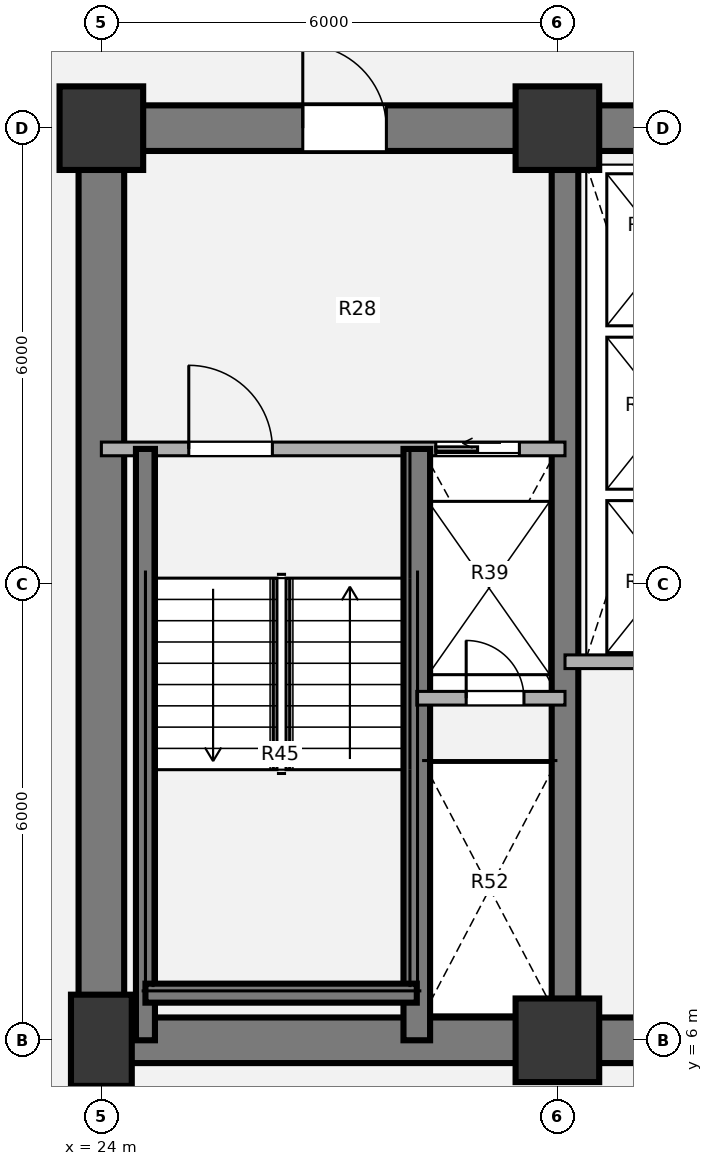
"""IFC4 building model, lengths in metres.
Left out: names, types, materials, properties, quantities, classifications, styles, units other than length and angle.
Written with IfcOpenShell. Run it as: python <this file> out.ifc"""

import sys

from ifc_helpers import new_model, si_unit, direction, frame, frame_2d, origin, origin_2d, place, context, subcontext, project, spatial, rectangle, extrude, source, transform, mapped, element, fill, save


model = new_model("IFC4")
c1 = context("Model", 3, precision=1e-05, world=origin(), true_north=direction((0.0, 1.0)))
c2 = subcontext(c1, "Body", "Model", "MODEL_VIEW")
j1 = project(units=[si_unit("LENGTHUNIT", "METRE"), si_unit("PLANEANGLEUNIT", "RADIAN")], contexts=[c1])
p1 = place(None, origin())
s1 = spatial("IfcSite", under=j1, at=p1, CompositionType="ELEMENT")
p2 = place(p1, origin())
s2 = spatial("IfcBuilding", under=s1, at=p2, CompositionType="ELEMENT")
p3 = place(p2, frame((0.0, 0.0, 30.78)))
s3 = spatial("IfcBuildingStorey", under=s2, at=p3, CompositionType="ELEMENT", Elevation=30.78)
m1 = source(origin(), c2, "Body", "SweptSolid", [
    extrude(rectangle(XDim=0.8, YDim=1.2, at=origin_2d()), origin(), (0.0, 0.0, 1.0), 3.78),
])
p4 = place(p3, frame((24.0, 6.0, 0.0), z_axis=(0.0, 0.0, 1.0), x_axis=(1.0, 0.0, 0.0)))
e1 = element("IfcColumn", 1, at=p4, inside=s3, PredefinedType="COLUMN", context=c2, shape_type="MappedRepresentation", body=[
    mapped(m1, transform((0.0, 0.0, 0.0), x_axis=(1.0, 0.0, 0.0), y_axis=(0.0, 1.0, 0.0), z_axis=(0.0, 0.0, 1.0), scale=1.0)),
])
m2 = source(origin(), c2, "Body", "SweptSolid", [
    extrude(rectangle(XDim=1.1, YDim=1.1, at=origin_2d()), origin(), (0.0, 0.0, 1.0), 3.78),
])
for number, where, z_axis, x_axis in (
    (2, (30.0, 6.0, 0.0), (0.0, 0.0, 1.0), (1.0, 0.0, 0.0)),
    (3, (24.0, 18.0, 0.0), (0.0, 0.0, 1.0), (1.0, 0.0, 0.0)),
    (4, (30.0, 18.0, 0.0), (0.0, 0.0, 1.0), (1.0, 0.0, 0.0)),
):
    element("IfcColumn", number, at=place(p3, frame(where, z_axis=z_axis, x_axis=x_axis)), inside=s3, PredefinedType="COLUMN", context=c2, shape_type="MappedRepresentation", body=[
        mapped(m2, transform((0.0, 0.0, 0.0), x_axis=(1.0, 0.0, 0.0), y_axis=(0.0, 1.0, 0.0), z_axis=(0.0, 0.0, 1.0), scale=1.0)),
    ])
p5 = place(p3, frame((48.3, 6.0, 0.0), z_axis=(0.0, 0.0, 1.0), x_axis=(-1.0, 0.0, 0.0)))
e5 = element("IfcWall", 5, at=p5, inside=s3, PredefinedType="SHEAR", context=c2, shape_type="SweptSolid", body=[
    extrude(rectangle(XDim=24.6, YDim=0.6, at=frame_2d((12.3, 0.0))), origin(), (0.0, 0.0, 1.0), 3.78),
])
p6 = place(p3, frame((24.0, 6.0, 0.0), z_axis=(0.0, 0.0, 1.0), x_axis=(0.0, 1.0, 0.0)))
e6 = element("IfcWall", 6, at=p6, inside=s3, PredefinedType="SHEAR", context=c2, shape_type="SweptSolid", body=[
    extrude(rectangle(XDim=12.0, YDim=0.6, at=frame_2d((6.0, 0.0))), origin(), (0.0, 0.0, 1.0), 3.78),
])
p7 = place(p3, frame((23.7, 18.0, 0.0), z_axis=(0.0, 0.0, 1.0), x_axis=(1.0, 0.0, 0.0)))
e7 = element("IfcWall", 7, at=p7, inside=s3, PredefinedType="SHEAR", context=c2, shape_type="SweptSolid", body=[
    extrude(rectangle(XDim=9.5, YDim=0.6, at=frame_2d((4.75, 0.0))), origin(), (0.0, 0.0, 1.0), 3.78),
])
p8 = place(p7, frame((2.95, 0.0, 0.0)))
e8 = element("IfcOpeningElement", 8, at=p8, cuts=e7, PredefinedType="OPENING", context=c2, shape_type="SweptSolid", body=[
    extrude(rectangle(XDim=1.1, YDim=2.1, at=origin_2d()), frame((0.55, 0.31, 1.05), z_axis=(0.0, -1.0, 0.0), x_axis=(1.0, 0.0, 0.0)), (0.0, 0.0, 1.0), 0.62),
])
p9 = place(p3, frame((30.1, 6.0, 0.0), z_axis=(0.0, 0.0, 1.0), x_axis=(0.0, 1.0, 0.0)))
e9 = element("IfcWall", 9, at=p9, inside=s3, PredefinedType="SHEAR", context=c2, shape_type="SweptSolid", body=[
    extrude(rectangle(XDim=12.0, YDim=0.35, at=frame_2d((6.0, 0.0))), origin(), (0.0, 0.0, 1.0), 3.78),
])
p10 = place(p3, frame((30.1, 10.98, 0.0), z_axis=(0.0, 0.0, 1.0), x_axis=(1.0, 0.0, 0.0)))
e10 = element("IfcWall", 10, at=p10, inside=s3, PredefinedType="PARTITIONING", context=c2, shape_type="SweptSolid", body=[
    extrude(rectangle(XDim=4.08, YDim=0.18, at=frame_2d((2.04, 0.0))), origin(), (0.0, 0.0, 1.0), 3.5),
])
p11 = place(p3, frame((24.0, 13.78, 0.0), z_axis=(0.0, 0.0, 1.0), x_axis=(1.0, 0.0, 0.0)))
e11 = element("IfcWall", 11, at=p11, inside=s3, PredefinedType="PARTITIONING", context=c2, shape_type="SweptSolid", body=[
    extrude(rectangle(XDim=6.1, YDim=0.18, at=frame_2d((3.05, 0.0))), origin(), (0.0, 0.0, 1.0), 3.5),
])
p12 = place(p11, frame((1.15, 0.0, 0.0)))
e12 = element("IfcOpeningElement", 12, at=p12, cuts=e11, PredefinedType="OPENING", context=c2, shape_type="SweptSolid", body=[
    extrude(rectangle(XDim=1.1, YDim=2.1, at=origin_2d()), frame((0.55, 0.1, 1.05), z_axis=(0.0, -1.0, 0.0), x_axis=(1.0, 0.0, 0.0)), (0.0, 0.0, 1.0), 0.2),
])
p13 = place(p11, frame((4.4, 0.0, 0.0)))
e13 = element("IfcOpeningElement", 13, at=p13, cuts=e11, PredefinedType="OPENING", context=c2, shape_type="SweptSolid", body=[
    extrude(rectangle(XDim=1.1, YDim=2.1, at=origin_2d()), frame((0.55, 0.1, 1.05), z_axis=(0.0, -1.0, 0.0), x_axis=(1.0, 0.0, 0.0)), (0.0, 0.0, 1.0), 0.2),
])
p14 = place(p3, frame((28.15, 6.0, 0.0), z_axis=(0.0, 0.0, 1.0), x_axis=(0.0, 1.0, 0.0)))
e14 = element("IfcWall", 14, at=p14, inside=s3, PredefinedType="SHEAR", context=c2, shape_type="SweptSolid", body=[
    extrude(rectangle(XDim=7.78, YDim=0.35, at=frame_2d((3.89, 0.0))), origin(), (0.0, 0.0, 1.0), 3.85),
])
p15 = place(p3, frame((24.58, 6.0, 0.0), z_axis=(0.0, 0.0, 1.0), x_axis=(0.0, 1.0, 0.0)))
e15 = element("IfcWall", 15, at=p15, inside=s3, PredefinedType="SHEAR", context=c2, shape_type="SweptSolid", body=[
    extrude(rectangle(XDim=7.78, YDim=0.25, at=frame_2d((3.89, 0.0))), origin(), (0.0, 0.0, 1.0), 3.85),
])
p16 = place(p3, frame((24.58, 6.62, 0.0), z_axis=(0.0, 0.0, 1.0), x_axis=(1.0, 0.0, 0.0)))
e16 = element("IfcWall", 16, at=p16, inside=s3, PredefinedType="SHEAR", context=c2, shape_type="SweptSolid", body=[
    extrude(rectangle(XDim=3.57, YDim=0.25, at=frame_2d((1.785, 0.0))), origin(), (0.0, 0.0, 1.0), 3.85),
])
p17 = place(p3, frame((28.15, 10.5, 0.0), z_axis=(0.0, 0.0, 1.0), x_axis=(1.0, 0.0, 0.0)))
e17 = element("IfcWall", 17, at=p17, inside=s3, PredefinedType="PARTITIONING", context=c2, shape_type="SweptSolid", body=[
    extrude(rectangle(XDim=1.95, YDim=0.18, at=frame_2d((0.975, 0.0))), origin(), (0.0, 0.0, 1.0), 3.5),
])
p18 = place(p17, frame((0.65, 0.0, 0.0)))
e18 = element("IfcOpeningElement", 18, at=p18, cuts=e17, PredefinedType="OPENING", context=c2, shape_type="SweptSolid", body=[
    extrude(rectangle(XDim=0.76, YDim=2.05, at=origin_2d()), frame((0.38, 0.1, 1.025), z_axis=(0.0, -1.0, 0.0), x_axis=(1.0, 0.0, 0.0)), (0.0, 0.0, 1.0), 0.2),
])
m3 = source(origin(), c2, "Body", "SweptSolid", [
    extrude(rectangle(XDim=1.1, YDim=2.1, at=origin_2d()), frame((0.55, 0.025, 1.05), z_axis=(0.0, -1.0, 0.0), x_axis=(1.0, 0.0, 0.0)), (0.0, 0.0, 1.0), 0.05),
])
p19 = place(p12, origin())
e19 = element("IfcDoor", 19, at=p19, inside=s3, OperationType="SINGLE_SWING_LEFT", PredefinedType="DOOR", context=c2, shape_type="MappedRepresentation", body=[
    mapped(m3, transform((0.0, 0.0, 0.0), x_axis=(1.0, 0.0, 0.0), y_axis=(0.0, 1.0, 0.0), z_axis=(0.0, 0.0, 1.0), scale=1.0)),
])
fill(e12, e19)
m4 = source(origin(), c2, "Body", "SweptSolid", [
    extrude(rectangle(XDim=1.1, YDim=2.1, at=origin_2d()), frame((0.55, 0.025, 1.05), z_axis=(0.0, -1.0, 0.0), x_axis=(1.0, 0.0, 0.0)), (0.0, 0.0, 1.0), 0.05),
])
p20 = place(p13, origin())
e20 = element("IfcDoor", 20, at=p20, inside=s3, OperationType="SLIDING_TO_LEFT", PredefinedType="DOOR", context=c2, shape_type="MappedRepresentation", body=[
    mapped(m4, transform((0.0, 0.0, 0.0), x_axis=(1.0, 0.0, 0.0), y_axis=(0.0, 1.0, 0.0), z_axis=(0.0, 0.0, 1.0), scale=1.0)),
])
fill(e13, e20)
m5 = source(origin(), c2, "Body", "SweptSolid", [
    extrude(rectangle(XDim=0.76, YDim=2.05, at=origin_2d()), frame((0.38, 0.025, 1.025), z_axis=(0.0, -1.0, 0.0), x_axis=(1.0, 0.0, 0.0)), (0.0, 0.0, 1.0), 0.05),
])
p21 = place(p18, origin())
e21 = element("IfcDoor", 21, at=p21, inside=s3, OperationType="SINGLE_SWING_LEFT", PredefinedType="DOOR", context=c2, shape_type="MappedRepresentation", body=[
    mapped(m5, transform((0.0, 0.0, 0.0), x_axis=(1.0, 0.0, 0.0), y_axis=(0.0, 1.0, 0.0), z_axis=(0.0, 0.0, 1.0), scale=1.0)),
])
fill(e18, e21)
m6 = source(origin(), c2, "Body", "SweptSolid", [
    extrude(rectangle(XDim=1.1, YDim=2.1, at=origin_2d()), frame((0.55, 0.025, 1.05), z_axis=(0.0, -1.0, 0.0), x_axis=(1.0, 0.0, 0.0)), (0.0, 0.0, 1.0), 0.05),
])
p22 = place(p8, origin())
e22 = element("IfcDoor", 22, at=p22, inside=s3, OperationType="SINGLE_SWING_LEFT", PredefinedType="DOOR", context=c2, shape_type="MappedRepresentation", body=[
    mapped(m6, transform((0.0, 0.0, 0.0), x_axis=(1.0, 0.0, 0.0), y_axis=(0.0, 1.0, 0.0), z_axis=(0.0, 0.0, 1.0), scale=1.0)),
])
fill(e8, e22)
save(model, sys.argv[1])
